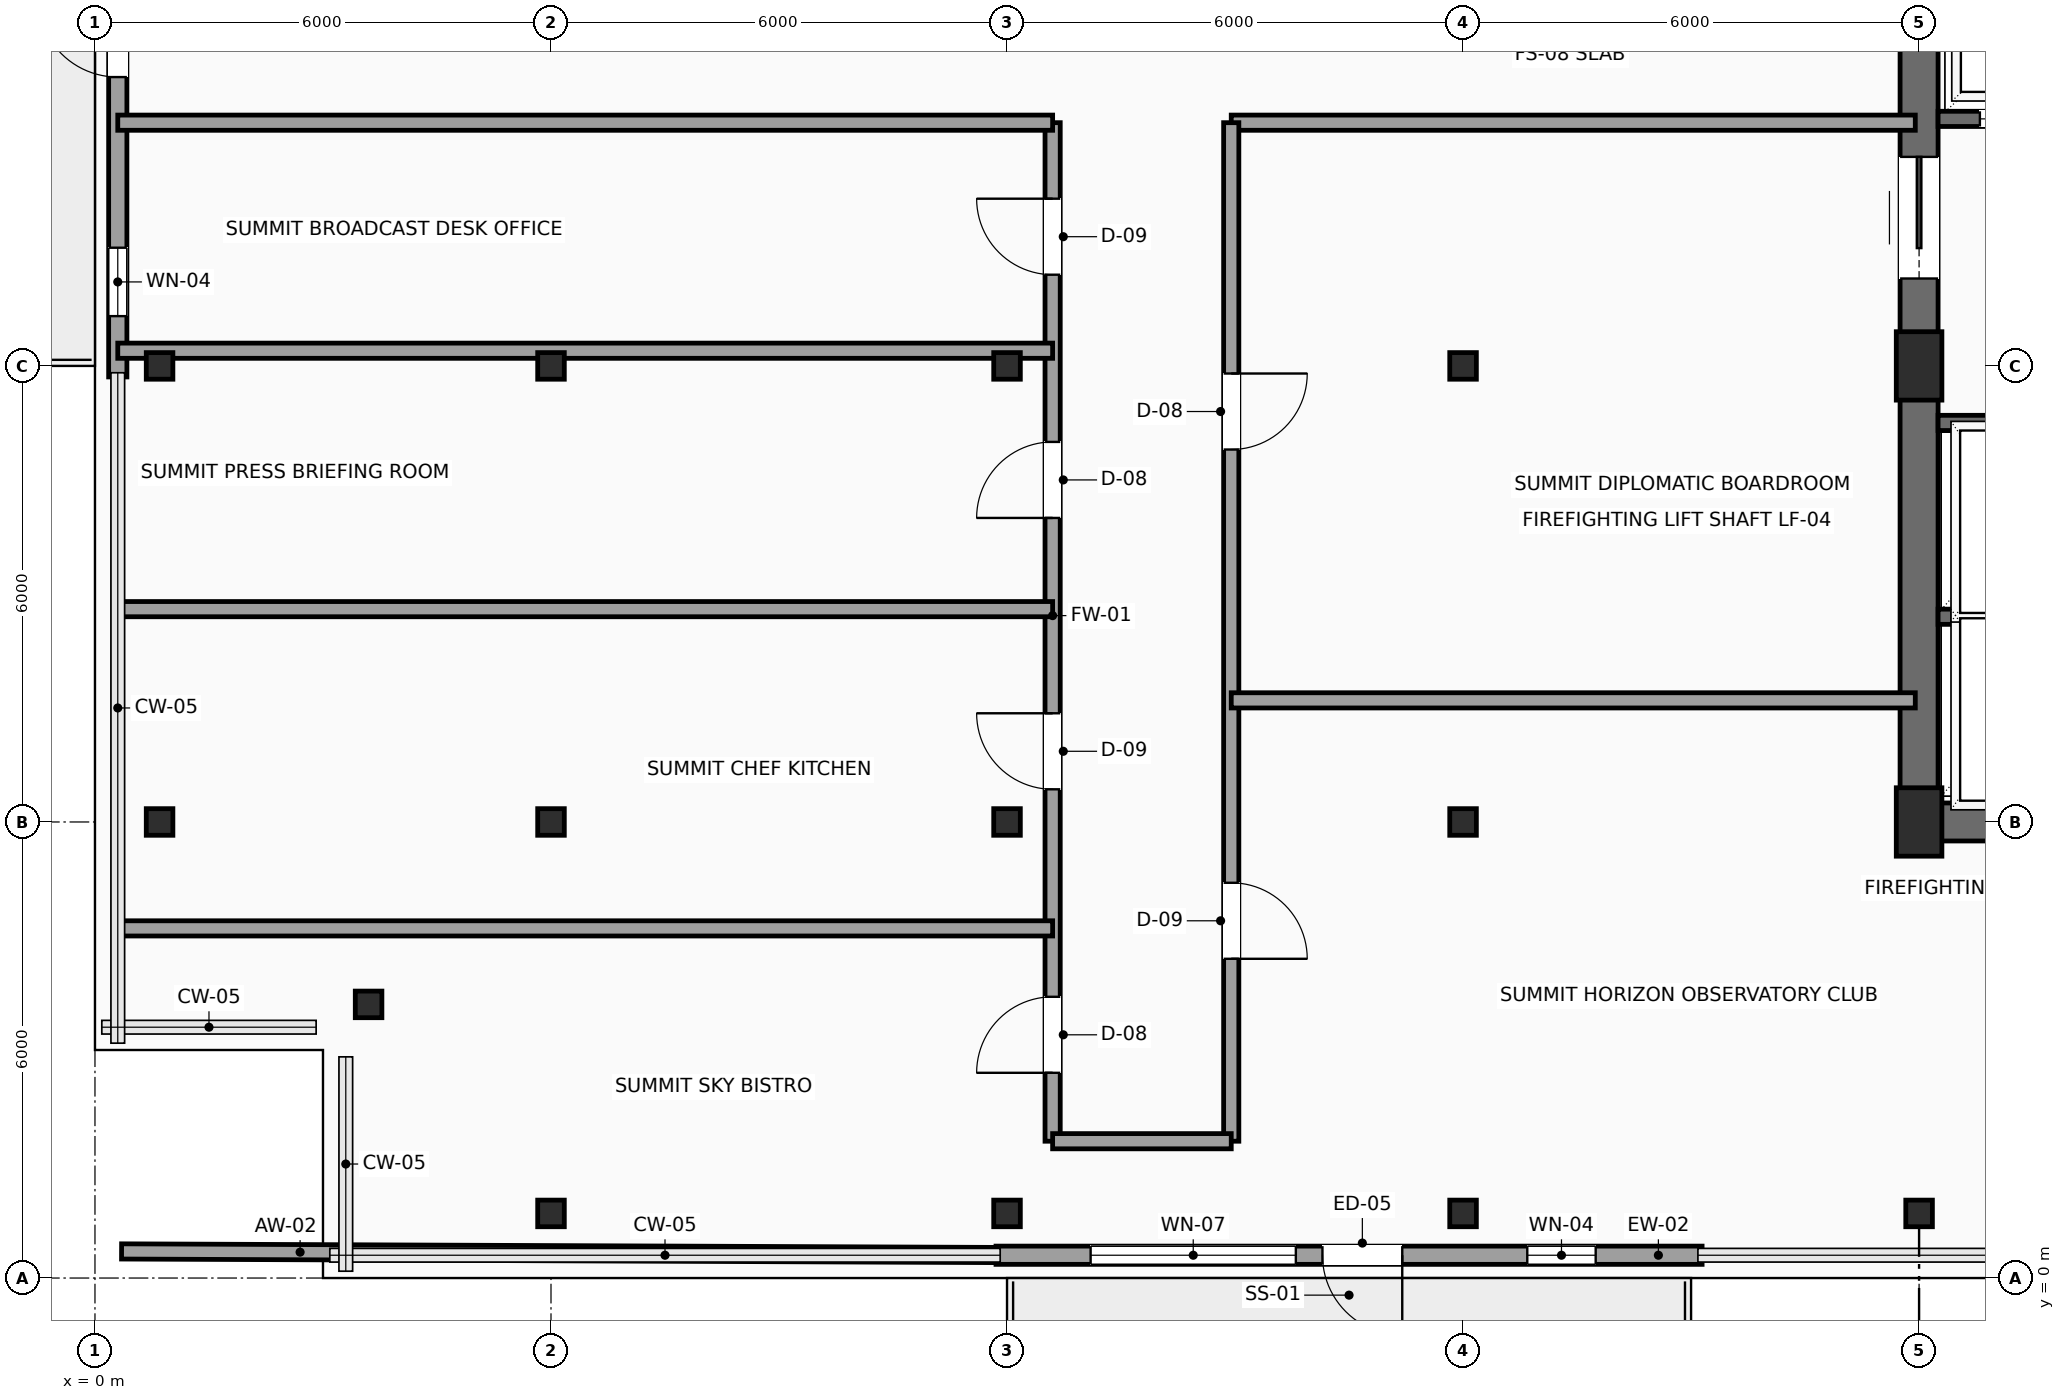
"""IFC4 building model, lengths in metres.
Left out: names, types, materials, properties, quantities, classifications, styles, units other than length and angle.
Written with IfcOpenShell. Run it as: python <this file> out.ifc"""

import sys

from ifc_helpers import new_model, si_unit, direction, frame, frame_2d, origin, origin_2d, place, context, subcontext, project, spatial, rectangle, hollow_rectangle, extrude, element, fill, save


model = new_model("IFC4")
c1 = context("Model", 3, precision=1e-05, world=origin(), true_north=direction((0.0, 1.0)))
c2 = subcontext(c1, "Body", "Model", "MODEL_VIEW")
j1 = project(units=[si_unit("LENGTHUNIT", "METRE"), si_unit("PLANEANGLEUNIT", "RADIAN")], contexts=[c1])
p1 = place(None, origin())
s1 = spatial("IfcSite", under=j1, at=p1, CompositionType="ELEMENT")
p2 = place(p1, origin())
s2 = spatial("IfcBuilding", under=s1, at=p2, CompositionType="ELEMENT")
p3 = place(p2, frame((0.0, 0.0, 281.7)))
s3 = spatial("IfcBuildingStorey", under=s2, at=p3, CompositionType="ELEMENT", Elevation=281.7)
for number, where, z_axis, x_axis in (
    (1, (24.0, 6.0, 0.0), (0.0, 0.0, 1.0), (1.0, 0.0, 0.0)),
    (2, (24.0, 12.0, 0.0), (0.0, 0.0, 1.0), (1.0, 0.0, 0.0)),
):
    element("IfcColumn", number, at=place(p3, frame(where, z_axis=z_axis, x_axis=x_axis)), inside=s3, PredefinedType="COLUMN", context=c2, shape_type="SweptSolid", body=[
        extrude(rectangle(XDim=0.6, YDim=0.9, at=origin_2d()), origin(), (0.0, 0.0, 1.0), 3.5),
    ])
for number, where, z_axis, x_axis in (
    (3, (3.6, 3.6, 0.0), (0.0, 0.0, 1.0), (1.0, 0.0, 0.0)),
    (4, (0.85, 6.0, 0.0), (0.0, 0.0, 1.0), (1.0, 0.0, 0.0)),
    (5, (0.85, 12.0, 0.0), (0.0, 0.0, 1.0), (1.0, 0.0, 0.0)),
    (6, (6.0, 0.85, 0.0), (0.0, 0.0, 1.0), (1.0, 0.0, 0.0)),
    (7, (6.0, 6.0, 0.0), (0.0, 0.0, 1.0), (1.0, 0.0, 0.0)),
    (8, (6.0, 12.0, 0.0), (0.0, 0.0, 1.0), (1.0, 0.0, 0.0)),
    (9, (12.0, 0.85, 0.0), (0.0, 0.0, 1.0), (1.0, 0.0, 0.0)),
    (10, (12.0, 6.0, 0.0), (0.0, 0.0, 1.0), (1.0, 0.0, 0.0)),
    (11, (12.0, 12.0, 0.0), (0.0, 0.0, 1.0), (1.0, 0.0, 0.0)),
    (12, (18.0, 0.85, 0.0), (0.0, 0.0, 1.0), (1.0, 0.0, 0.0)),
    (13, (18.0, 6.0, 0.0), (0.0, 0.0, 1.0), (1.0, 0.0, 0.0)),
    (14, (18.0, 12.0, 0.0), (0.0, 0.0, 1.0), (1.0, 0.0, 0.0)),
    (15, (24.0, 0.85, 0.0), (0.0, 0.0, 1.0), (1.0, 0.0, 0.0)),
):
    element("IfcColumn", number, at=place(p3, frame(where, z_axis=z_axis, x_axis=x_axis)), inside=s3, PredefinedType="COLUMN", context=c2, shape_type="SweptSolid", body=[
        extrude(hollow_rectangle(XDim=0.35, YDim=0.35, WallThickness=0.016, InnerFilletRadius=0.016, OuterFilletRadius=0.032, at=origin_2d()), origin(), (0.0, 0.0, 1.0), 3.5),
    ])
p4 = place(p3, frame((21.145, 0.3, 0.0), z_axis=(0.0, 0.0, 1.0), x_axis=(-1.0, 0.0, 0.0)))
e16 = element("IfcWall", 16, at=p4, inside=s3, PredefinedType="SOLIDWALL", context=c2, shape_type="SweptSolid", body=[
    extrude(rectangle(XDim=9.29, YDim=0.24, at=frame_2d((4.645, 0.0))), origin(), (0.0, 0.0, 1.0), 3.3),
])
p5 = place(p4, frame((3.945, 0.0, 0.0)))
e17 = element("IfcOpeningElement", 17, at=p5, cuts=e16, PredefinedType="OPENING", context=c2, shape_type="SweptSolid", body=[
    extrude(rectangle(XDim=1.05, YDim=2.2, at=frame_2d((0.525, 1.1))), frame((0.0, 0.13, 0.0), z_axis=(0.0, -1.0, 0.0), x_axis=(1.0, 0.0, 0.0)), (0.0, 0.0, 1.0), 0.26),
])
p6 = place(p4, frame((5.345, 0.0, 0.6)))
e18 = element("IfcOpeningElement", 18, at=p6, cuts=e16, PredefinedType="OPENING", context=c2, shape_type="SweptSolid", body=[
    extrude(rectangle(XDim=2.7, YDim=2.3, at=frame_2d((1.35, 1.15))), frame((0.0, 0.13, 0.0), z_axis=(0.0, -1.0, 0.0), x_axis=(1.0, 0.0, 0.0)), (0.0, 0.0, 1.0), 0.26),
])
p7 = place(p4, frame((1.4, 0.0, 0.6)))
e19 = element("IfcOpeningElement", 19, at=p7, cuts=e16, PredefinedType="OPENING", context=c2, shape_type="SweptSolid", body=[
    extrude(rectangle(XDim=0.9, YDim=2.2, at=frame_2d((0.45, 1.1))), frame((0.0, 0.13, 0.0), z_axis=(0.0, -1.0, 0.0), x_axis=(1.0, 0.0, 0.0)), (0.0, 0.0, 1.0), 0.26),
])
p8 = place(p3, frame((0.3, 11.855, 0.0), z_axis=(0.0, 0.0, 1.0), x_axis=(0.0, 1.0, 0.0)))
e20 = element("IfcWall", 20, at=p8, inside=s3, PredefinedType="SOLIDWALL", context=c2, shape_type="SweptSolid", body=[
    extrude(rectangle(XDim=9.29, YDim=0.24, at=frame_2d((4.645, 0.0))), origin(), (0.0, 0.0, 1.0), 3.3),
])
p9 = place(p8, frame((3.945, 0.0, 0.0)))
e21 = element("IfcOpeningElement", 21, at=p9, cuts=e20, PredefinedType="OPENING", context=c2, shape_type="SweptSolid", body=[
    extrude(rectangle(XDim=1.05, YDim=2.2, at=frame_2d((0.525, 1.1))), frame((0.0, 0.13, 0.0), z_axis=(0.0, -1.0, 0.0), x_axis=(1.0, 0.0, 0.0)), (0.0, 0.0, 1.0), 0.26),
])
p10 = place(p8, frame((6.2, 0.0, 0.6)))
e22 = element("IfcOpeningElement", 22, at=p10, cuts=e20, PredefinedType="OPENING", context=c2, shape_type="SweptSolid", body=[
    extrude(rectangle(XDim=2.7, YDim=2.3, at=frame_2d((1.35, 1.15))), frame((0.0, 0.13, 0.0), z_axis=(0.0, -1.0, 0.0), x_axis=(1.0, 0.0, 0.0)), (0.0, 0.0, 1.0), 0.26),
])
p11 = place(p8, frame((0.8, 0.0, 0.6)))
e23 = element("IfcOpeningElement", 23, at=p11, cuts=e20, PredefinedType="OPENING", context=c2, shape_type="SweptSolid", body=[
    extrude(rectangle(XDim=0.9, YDim=2.2, at=frame_2d((0.45, 1.1))), frame((0.0, 0.13, 0.0), z_axis=(0.0, -1.0, 0.0), x_axis=(1.0, 0.0, 0.0)), (0.0, 0.0, 1.0), 0.26),
])
p12 = place(p3, frame((24.0, 6.0, 0.0), z_axis=(0.0, 0.0, 1.0), x_axis=(1.0, 0.0, 0.0)))
e24 = element("IfcWall", 24, at=p12, inside=s3, PredefinedType="SHEAR", context=c2, shape_type="SweptSolid", body=[
    extrude(rectangle(XDim=9.6, YDim=0.5, at=frame_2d((4.8, 0.0))), origin(), (0.0, 0.0, 1.0), 3.3),
])
p13 = place(p3, frame((24.0, 6.0, 0.0), z_axis=(0.0, 0.0, 1.0), x_axis=(0.0, 1.0, 0.0)))
e25 = element("IfcWall", 25, at=p13, inside=s3, PredefinedType="SHEAR", context=c2, shape_type="SweptSolid", body=[
    extrude(rectangle(XDim=12.0, YDim=0.5, at=frame_2d((6.0, 0.0))), origin(), (0.0, 0.0, 1.0), 3.3),
])
p14 = place(p13, frame((7.15, 0.0, 0.0)))
e26 = element("IfcOpeningElement", 26, at=p14, cuts=e25, PredefinedType="OPENING", context=c2, shape_type="SweptSolid", body=[
    extrude(rectangle(XDim=1.6, YDim=2.3, at=frame_2d((0.8, 1.15))), frame((0.0, 0.26, 0.0), z_axis=(0.0, -1.0, 0.0), x_axis=(1.0, 0.0, 0.0)), (0.0, 0.0, 1.0), 0.52),
])
for number, where, z_axis, x_axis in (
    (27, (24.25, 8.7, 0.0), (0.0, 0.0, 1.0), (1.0, 0.0, 0.0)),
    (28, (24.25, 11.25, 0.0), (0.0, 0.0, 1.0), (1.0, 0.0, 0.0)),
):
    element("IfcWall", number, at=place(p3, frame(where, z_axis=z_axis, x_axis=x_axis)), inside=s3, PredefinedType="SHEAR", context=c2, shape_type="SweptSolid", body=[
        extrude(rectangle(XDim=2.17, YDim=0.2, at=frame_2d((1.085, 0.0))), origin(), (0.0, 0.0, 1.0), 3.3),
    ])
p15 = place(p3, frame((24.25, 15.25, 0.0), z_axis=(0.0, 0.0, 1.0), x_axis=(1.0, 0.0, 0.0)))
e29 = element("IfcWall", 29, at=p15, inside=s3, PredefinedType="SHEAR", context=c2, shape_type="SweptSolid", body=[
    extrude(rectangle(XDim=5.2, YDim=0.2, at=frame_2d((2.6, 0.0))), origin(), (0.0, 0.0, 1.0), 3.3),
])
p16 = place(p15, frame((0.55, 0.0, 0.0)))
e30 = element("IfcOpeningElement", 30, at=p16, cuts=e29, PredefinedType="OPENING", context=c2, shape_type="SweptSolid", body=[
    extrude(rectangle(XDim=1.2, YDim=2.2, at=frame_2d((0.6, 1.1))), frame((0.0, 0.11, 0.0), z_axis=(0.0, -1.0, 0.0), x_axis=(1.0, 0.0, 0.0)), (0.0, 0.0, 1.0), 0.22),
])
p17 = place(p15, frame((3.15, 0.0, 0.0)))
e31 = element("IfcOpeningElement", 31, at=p17, cuts=e29, PredefinedType="OPENING", context=c2, shape_type="SweptSolid", body=[
    extrude(rectangle(XDim=1.2, YDim=2.2, at=frame_2d((0.6, 1.1))), frame((0.0, 0.11, 0.0), z_axis=(0.0, -1.0, 0.0), x_axis=(1.0, 0.0, 0.0)), (0.0, 0.0, 1.0), 0.22),
])
p18 = place(p3, frame((12.6, 1.8, 0.0), z_axis=(0.0, 0.0, 1.0), x_axis=(0.0, 1.0, 0.0)))
e32 = element("IfcWall", 32, at=p18, inside=s3, PredefinedType="SOLIDWALL", context=c2, shape_type="SweptSolid", body=[
    extrude(rectangle(XDim=13.4, YDim=0.2, at=frame_2d((6.7, 0.0))), origin(), (0.0, 0.0, 1.0), 3.3),
])
p19 = place(p18, frame((0.9, 0.0, 0.0)))
e33 = element("IfcOpeningElement", 33, at=p19, cuts=e32, PredefinedType="OPENING", context=c2, shape_type="SweptSolid", body=[
    extrude(rectangle(XDim=1.0, YDim=2.2, at=frame_2d((0.5, 1.1))), frame((0.0, 0.11, 0.0), z_axis=(0.0, -1.0, 0.0), x_axis=(1.0, 0.0, 0.0)), (0.0, 0.0, 1.0), 0.22),
])
p20 = place(p18, frame((4.63, 0.0, 0.0)))
e34 = element("IfcOpeningElement", 34, at=p20, cuts=e32, PredefinedType="OPENING", context=c2, shape_type="SweptSolid", body=[
    extrude(rectangle(XDim=1.0, YDim=2.2, at=frame_2d((0.5, 1.1))), frame((0.0, 0.11, 0.0), z_axis=(0.0, -1.0, 0.0), x_axis=(1.0, 0.0, 0.0)), (0.0, 0.0, 1.0), 0.22),
])
p21 = place(p18, frame((8.2, 0.0, 0.0)))
e35 = element("IfcOpeningElement", 35, at=p21, cuts=e32, PredefinedType="OPENING", context=c2, shape_type="SweptSolid", body=[
    extrude(rectangle(XDim=1.0, YDim=2.2, at=frame_2d((0.5, 1.1))), frame((0.0, 0.11, 0.0), z_axis=(0.0, -1.0, 0.0), x_axis=(1.0, 0.0, 0.0)), (0.0, 0.0, 1.0), 0.22),
])
p22 = place(p18, frame((11.4, 0.0, 0.0)))
e36 = element("IfcOpeningElement", 36, at=p22, cuts=e32, PredefinedType="OPENING", context=c2, shape_type="SweptSolid", body=[
    extrude(rectangle(XDim=1.0, YDim=2.2, at=frame_2d((0.5, 1.1))), frame((0.0, 0.11, 0.0), z_axis=(0.0, -1.0, 0.0), x_axis=(1.0, 0.0, 0.0)), (0.0, 0.0, 1.0), 0.22),
])
p23 = place(p3, frame((12.6, 15.2, 0.0), z_axis=(0.0, 0.0, 1.0), x_axis=(-1.0, 0.0, 0.0)))
e37 = element("IfcWall", 37, at=p23, inside=s3, PredefinedType="SOLIDWALL", context=c2, shape_type="SweptSolid", body=[
    extrude(rectangle(XDim=12.3, YDim=0.2, at=frame_2d((6.15, 0.0))), origin(), (0.0, 0.0, 1.0), 2.932),
])
p24 = place(p3, frame((23.95, 15.2, 0.0), z_axis=(0.0, 0.0, 1.0), x_axis=(-1.0, 0.0, 0.0)))
e38 = element("IfcWall", 38, at=p24, inside=s3, PredefinedType="SOLIDWALL", context=c2, shape_type="SweptSolid", body=[
    extrude(rectangle(XDim=9.0, YDim=0.2, at=frame_2d((4.5, 0.0))), origin(), (0.0, 0.0, 1.0), 2.932),
])
p25 = place(p3, frame((14.95, 15.2, 0.0), z_axis=(0.0, 0.0, 1.0), x_axis=(0.0, -1.0, 0.0)))
e39 = element("IfcWall", 39, at=p25, inside=s3, PredefinedType="SOLIDWALL", context=c2, shape_type="SweptSolid", body=[
    extrude(rectangle(XDim=13.4, YDim=0.2, at=frame_2d((6.7, 0.0))), origin(), (0.0, 0.0, 1.0), 3.3),
])
p26 = place(p25, frame((10.0, 0.0, 0.0)))
e40 = element("IfcOpeningElement", 40, at=p26, cuts=e39, PredefinedType="OPENING", context=c2, shape_type="SweptSolid", body=[
    extrude(rectangle(XDim=1.0, YDim=2.2, at=frame_2d((0.5, 1.1))), frame((0.0, 0.11, 0.0), z_axis=(0.0, -1.0, 0.0), x_axis=(1.0, 0.0, 0.0)), (0.0, 0.0, 1.0), 0.22),
])
p27 = place(p25, frame((3.3, 0.0, 0.0)))
e41 = element("IfcOpeningElement", 41, at=p27, cuts=e39, PredefinedType="OPENING", context=c2, shape_type="SweptSolid", body=[
    extrude(rectangle(XDim=1.0, YDim=2.2, at=frame_2d((0.5, 1.1))), frame((0.0, 0.11, 0.0), z_axis=(0.0, -1.0, 0.0), x_axis=(1.0, 0.0, 0.0)), (0.0, 0.0, 1.0), 0.22),
])
p28 = place(p3, frame((14.95, 1.8, 0.0), z_axis=(0.0, 0.0, 1.0), x_axis=(-1.0, 0.0, 0.0)))
e42 = element("IfcWall", 42, at=p28, inside=s3, PredefinedType="SOLIDWALL", context=c2, shape_type="SweptSolid", body=[
    extrude(rectangle(XDim=2.35, YDim=0.2, at=frame_2d((1.175, 0.0))), origin(), (0.0, 0.0, 1.0), 3.3),
])
p29 = place(p3, frame((0.35, 0.35, 0.0), z_axis=(0.0, 0.0, 1.0), x_axis=(0.999991613227, -0.004095543276, 0.0)))
e43 = element("IfcWall", 43, at=p29, inside=s3, PredefinedType="PARTITIONING", context=c2, shape_type="SweptSolid", body=[
    extrude(rectangle(XDim=11.505, YDim=0.2, at=frame_2d((5.752, 0.0))), origin(), (0.0, 0.0, 1.0), 3.3),
])
p30 = place(p3, frame((0.3, 4.6, 0.0), z_axis=(0.0, 0.0, 1.0), x_axis=(1.0, 0.0, 0.0)))
e44 = element("IfcWall", 44, at=p30, inside=s3, PredefinedType="PARTITIONING", context=c2, shape_type="SweptSolid", body=[
    extrude(rectangle(XDim=12.3, YDim=0.2, at=frame_2d((6.15, 0.0))), origin(), (0.0, 0.0, 1.0), 3.3),
])
p31 = place(p3, frame((0.3, 8.8, 0.0), z_axis=(0.0, 0.0, 1.0), x_axis=(1.0, 0.0, 0.0)))
e45 = element("IfcWall", 45, at=p31, inside=s3, PredefinedType="PARTITIONING", context=c2, shape_type="SweptSolid", body=[
    extrude(rectangle(XDim=12.3, YDim=0.2, at=frame_2d((6.15, 0.0))), origin(), (0.0, 0.0, 1.0), 2.932),
])
p32 = place(p3, frame((0.3, 12.2, 0.0), z_axis=(0.0, 0.0, 1.0), x_axis=(1.0, 0.0, 0.0)))
e46 = element("IfcWall", 46, at=p32, inside=s3, PredefinedType="PARTITIONING", context=c2, shape_type="SweptSolid", body=[
    extrude(rectangle(XDim=12.3, YDim=0.2, at=frame_2d((6.15, 0.0))), origin(), (0.0, 0.0, 1.0), 2.992),
])
p33 = place(p3, frame((14.95, 7.6, 0.0), z_axis=(0.0, 0.0, 1.0), x_axis=(1.0, 0.0, 0.0)))
e47 = element("IfcWall", 47, at=p33, inside=s3, PredefinedType="PARTITIONING", context=c2, shape_type="SweptSolid", body=[
    extrude(rectangle(XDim=9.0, YDim=0.2, at=frame_2d((4.5, 0.0))), origin(), (0.0, 0.0, 1.0), 3.3),
])
p34 = place(p5, origin())
e48 = element("IfcDoor", 48, at=p34, inside=s3, OperationType="SINGLE_SWING_LEFT", PredefinedType="DOOR", context=c2, shape_type="SweptSolid", body=[
    extrude(rectangle(XDim=1.05, YDim=2.2, at=frame_2d((0.525, 1.1))), frame((0.0, 0.025, 0.0), z_axis=(0.0, -1.0, 0.0), x_axis=(1.0, 0.0, 0.0)), (0.0, 0.0, 1.0), 0.05),
])
fill(e17, e48)
p35 = place(p6, origin())
e49 = element("IfcWindow", 49, at=p35, inside=s3, PartitioningType="SINGLE_PANEL", PredefinedType="WINDOW", context=c2, shape_type="SweptSolid", body=[
    extrude(rectangle(XDim=2.7, YDim=2.3, at=frame_2d((1.35, 1.15))), frame((0.0, 0.03, 0.0), z_axis=(0.0, -1.0, 0.0), x_axis=(1.0, 0.0, 0.0)), (0.0, 0.0, 1.0), 0.06),
])
fill(e18, e49)
p36 = place(p7, origin())
e50 = element("IfcWindow", 50, at=p36, inside=s3, PartitioningType="SINGLE_PANEL", PredefinedType="WINDOW", context=c2, shape_type="SweptSolid", body=[
    extrude(rectangle(XDim=0.9, YDim=2.2, at=frame_2d((0.45, 1.1))), frame((0.0, 0.03, 0.0), z_axis=(0.0, -1.0, 0.0), x_axis=(1.0, 0.0, 0.0)), (0.0, 0.0, 1.0), 0.06),
])
fill(e19, e50)
p37 = place(p9, origin())
e51 = element("IfcDoor", 51, at=p37, inside=s3, OperationType="SINGLE_SWING_RIGHT", PredefinedType="DOOR", context=c2, shape_type="SweptSolid", body=[
    extrude(rectangle(XDim=1.05, YDim=2.2, at=frame_2d((0.525, 1.1))), frame((0.0, 0.025, 0.0), z_axis=(0.0, -1.0, 0.0), x_axis=(1.0, 0.0, 0.0)), (0.0, 0.0, 1.0), 0.05),
])
fill(e21, e51)
p38 = place(p11, origin())
e52 = element("IfcWindow", 52, at=p38, inside=s3, PartitioningType="SINGLE_PANEL", PredefinedType="WINDOW", context=c2, shape_type="SweptSolid", body=[
    extrude(rectangle(XDim=0.9, YDim=2.2, at=frame_2d((0.45, 1.1))), frame((0.0, 0.03, 0.0), z_axis=(0.0, -1.0, 0.0), x_axis=(1.0, 0.0, 0.0)), (0.0, 0.0, 1.0), 0.06),
])
fill(e23, e52)
p39 = place(p14, origin())
e53 = element("IfcDoor", 53, at=p39, inside=s3, OperationType="DOUBLE_DOOR_SLIDING", PredefinedType="DOOR", context=c2, shape_type="SweptSolid", body=[
    extrude(rectangle(XDim=1.6, YDim=2.3, at=frame_2d((0.8, 1.15))), frame((0.0, 0.025, 0.0), z_axis=(0.0, -1.0, 0.0), x_axis=(1.0, 0.0, 0.0)), (0.0, 0.0, 1.0), 0.05),
])
fill(e26, e53)
p40 = place(p16, origin())
e54 = element("IfcDoor", 54, at=p40, inside=s3, OperationType="SLIDING_TO_RIGHT", PredefinedType="DOOR", context=c2, shape_type="SweptSolid", body=[
    extrude(rectangle(XDim=1.2, YDim=2.2, at=frame_2d((0.6, 1.1))), frame((0.0, 0.025, 0.0), z_axis=(0.0, -1.0, 0.0), x_axis=(1.0, 0.0, 0.0)), (0.0, 0.0, 1.0), 0.05),
])
fill(e30, e54)
p41 = place(p19, origin())
e55 = element("IfcDoor", 55, at=p41, inside=s3, OperationType="SINGLE_SWING_LEFT", PredefinedType="DOOR", context=c2, shape_type="SweptSolid", body=[
    extrude(rectangle(XDim=1.0, YDim=2.2, at=frame_2d((0.5, 1.1))), frame((0.0, 0.025, 0.0), z_axis=(0.0, -1.0, 0.0), x_axis=(1.0, 0.0, 0.0)), (0.0, 0.0, 1.0), 0.05),
])
fill(e33, e55)
p42 = place(p20, origin())
e56 = element("IfcDoor", 56, at=p42, inside=s3, OperationType="SINGLE_SWING_RIGHT", PredefinedType="DOOR", context=c2, shape_type="SweptSolid", body=[
    extrude(rectangle(XDim=1.0, YDim=2.2, at=frame_2d((0.5, 1.1))), frame((0.0, 0.025, 0.0), z_axis=(0.0, -1.0, 0.0), x_axis=(1.0, 0.0, 0.0)), (0.0, 0.0, 1.0), 0.05),
])
fill(e34, e56)
p43 = place(p21, origin())
e57 = element("IfcDoor", 57, at=p43, inside=s3, OperationType="SINGLE_SWING_LEFT", PredefinedType="DOOR", context=c2, shape_type="SweptSolid", body=[
    extrude(rectangle(XDim=1.0, YDim=2.2, at=frame_2d((0.5, 1.1))), frame((0.0, 0.025, 0.0), z_axis=(0.0, -1.0, 0.0), x_axis=(1.0, 0.0, 0.0)), (0.0, 0.0, 1.0), 0.05),
])
fill(e35, e57)
p44 = place(p22, origin())
e58 = element("IfcDoor", 58, at=p44, inside=s3, OperationType="SINGLE_SWING_RIGHT", PredefinedType="DOOR", context=c2, shape_type="SweptSolid", body=[
    extrude(rectangle(XDim=1.0, YDim=2.2, at=frame_2d((0.5, 1.1))), frame((0.0, 0.025, 0.0), z_axis=(0.0, -1.0, 0.0), x_axis=(1.0, 0.0, 0.0)), (0.0, 0.0, 1.0), 0.05),
])
fill(e36, e58)
p45 = place(p26, origin())
e59 = element("IfcDoor", 59, at=p45, inside=s3, OperationType="SINGLE_SWING_RIGHT", PredefinedType="DOOR", context=c2, shape_type="SweptSolid", body=[
    extrude(rectangle(XDim=1.0, YDim=2.2, at=frame_2d((0.5, 1.1))), frame((0.0, 0.025, 0.0), z_axis=(0.0, -1.0, 0.0), x_axis=(1.0, 0.0, 0.0)), (0.0, 0.0, 1.0), 0.05),
])
fill(e40, e59)
p46 = place(p27, origin())
e60 = element("IfcDoor", 60, at=p46, inside=s3, OperationType="SINGLE_SWING_LEFT", PredefinedType="DOOR", context=c2, shape_type="SweptSolid", body=[
    extrude(rectangle(XDim=1.0, YDim=2.2, at=frame_2d((0.5, 1.1))), frame((0.0, 0.025, 0.0), z_axis=(0.0, -1.0, 0.0), x_axis=(1.0, 0.0, 0.0)), (0.0, 0.0, 1.0), 0.05),
])
fill(e41, e60)
save(model, sys.argv[1])
